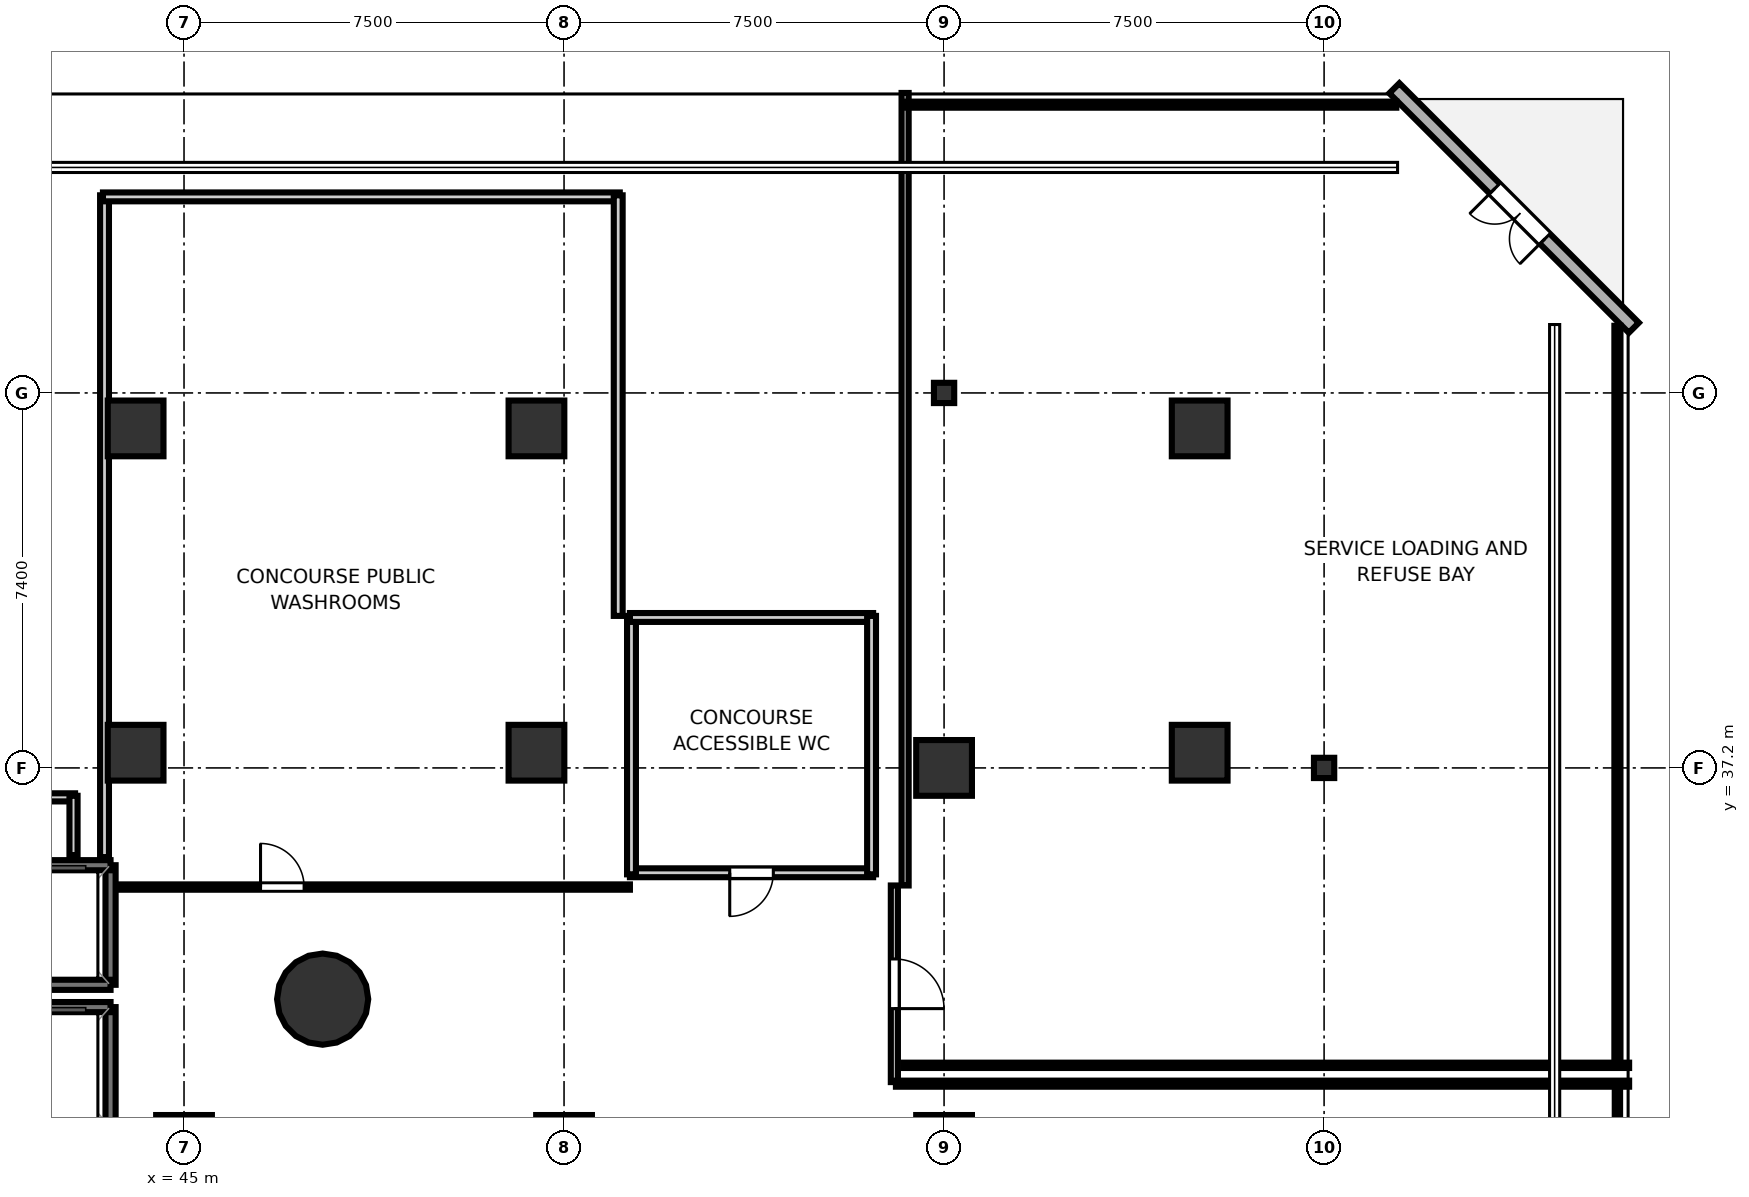
"""IFC4 building model, lengths in metres.
Left out: names, types, materials, properties, quantities, classifications, styles, units other than length and angle.
Written with IfcOpenShell. Run it as: python <this file> out.ifc"""

import sys

from ifc_helpers import new_model, si_unit, direction, frame, frame_2d, origin, origin_2d, place, context, subcontext, project, spatial, rectangle, hollow_circle, i_section, extrude, element, fill, save


model = new_model("IFC4")
c1 = context("Model", 3, precision=1e-05, world=origin(), true_north=direction((0.0, 1.0)))
c2 = subcontext(c1, "Body", "Model", "MODEL_VIEW")
j1 = project(units=[si_unit("LENGTHUNIT", "METRE"), si_unit("PLANEANGLEUNIT", "RADIAN")], contexts=[c1])
p1 = place(None, origin())
s1 = spatial("IfcSite", under=j1, at=p1, CompositionType="ELEMENT")
p2 = place(p1, origin())
s2 = spatial("IfcBuilding", under=s1, at=p2, CompositionType="ELEMENT")
p3 = place(p2, origin())
s3 = spatial("IfcBuildingStorey", under=s2, at=p3, CompositionType="ELEMENT", Elevation=0.0)
p4 = place(p3, frame((47.736, 32.637, 0.0), z_axis=(0.0, 0.0, 1.0), x_axis=(1.0, 0.0, 0.0)))
e1 = element("IfcColumn", 1, at=p4, inside=s3, PredefinedType="COLUMN", context=c2, shape_type="SweptSolid", body=[
    extrude(hollow_circle(Radius=0.9, WallThickness=0.045, at=origin_2d()), origin(), (0.0, 0.0, 1.0), 6.0),
])
for number, where, z_axis, x_axis in (
    (2, (44.045, 43.9, 0.0), (0.0, 0.0, 1.0), (1.0, 0.0, 0.0)),
    (3, (44.045, 37.5, 0.0), (0.0, 0.0, 1.0), (1.0, 0.0, 0.0)),
    (4, (51.955, 43.9, 0.0), (0.0, 0.0, 1.0), (1.0, 0.0, 0.0)),
    (5, (51.955, 37.5, 0.0), (0.0, 0.0, 1.0), (1.0, 0.0, 0.0)),
    (6, (65.045, 43.9, 0.0), (0.0, 0.0, 1.0), (1.0, 0.0, 0.0)),
    (7, (65.045, 37.5, 0.0), (0.0, 0.0, 1.0), (1.0, 0.0, 0.0)),
    (8, (45.0, 29.8, 0.0), (0.0, 0.0, 1.0), (1.0, 0.0, 0.0)),
    (9, (52.5, 29.8, 0.0), (0.0, 0.0, 1.0), (1.0, 0.0, 0.0)),
    (10, (60.0, 29.8, 0.0), (0.0, 0.0, 1.0), (1.0, 0.0, 0.0)),
    (11, (60.0, 37.2, 0.0), (0.0, 0.0, 1.0), (1.0, 0.0, 0.0)),
):
    element("IfcColumn", number, at=place(p3, frame(where, z_axis=z_axis, x_axis=x_axis)), inside=s3, PredefinedType="COLUMN", context=c2, shape_type="SweptSolid", body=[
        extrude(rectangle(XDim=1.1, YDim=1.1, at=origin_2d()), origin(), (0.0, 0.0, 1.0), 6.0),
    ])
for number, where, z_axis, x_axis in (
    (12, (60.0, 44.6, 0.0), (0.0, 0.0, 1.0), (1.0, 0.0, 0.0)),
    (13, (67.5, 37.2, 0.0), (0.0, 0.0, 1.0), (1.0, 0.0, 0.0)),
):
    element("IfcColumn", number, at=place(p3, frame(where, z_axis=z_axis, x_axis=x_axis)), inside=s3, PredefinedType="COLUMN", context=c2, shape_type="SweptSolid", body=[
        extrude(i_section(OverallWidth=0.4, OverallDepth=0.4, WebThickness=0.013, FlangeThickness=0.021, at=origin_2d()), origin(), (0.0, 0.0, 1.0), 6.0),
    ])
p5 = place(p3, frame((73.613, 45.887, 0.0), z_axis=(0.0, 0.0, 1.0), x_axis=(-0.707106781187, 0.707106781187, 0.0)))
e14 = element("IfcWall", 14, at=p5, inside=s3, PredefinedType="SOLIDWALL", context=c2, shape_type="SweptSolid", body=[
    extrude(rectangle(XDim=6.684, YDim=0.28, at=frame_2d((3.342, 0.0))), origin(), (0.0, 0.0, 1.0), 5.78),
])
p6 = place(p5, frame((2.482, 0.0, 0.0)))
e15 = element("IfcOpeningElement", 15, at=p6, cuts=e14, PredefinedType="OPENING", context=c2, shape_type="SweptSolid", body=[
    extrude(rectangle(XDim=1.4, YDim=2.2, at=frame_2d((0.7, 1.1))), frame((0.0, 0.15, 0.0), z_axis=(0.0, -1.0, 0.0), x_axis=(1.0, 0.0, 0.0)), (0.0, 0.0, 1.0), 0.3),
])
p7 = place(p3, frame((43.55, 30.12, 0.0), z_axis=(0.0, 0.0, 1.0), x_axis=(0.0, 1.0, 0.0)))
e16 = element("IfcWall", 16, at=p7, inside=s3, PredefinedType="SOLIDWALL", context=c2, shape_type="SweptSolid", body=[
    extrude(rectangle(XDim=2.36, YDim=0.2, at=frame_2d((1.18, 0.0))), origin(), (0.0, 0.0, 1.0), 5.78),
])
p8 = place(p3, frame((41.45, 32.48, 0.0), z_axis=(0.0, 0.0, 1.0), x_axis=(1.0, 0.0, 0.0)))
e17 = element("IfcWall", 17, at=p8, inside=s3, PredefinedType="SOLIDWALL", context=c2, shape_type="SweptSolid", body=[
    extrude(rectangle(XDim=2.1, YDim=0.2, at=frame_2d((1.05, 0.0))), origin(), (0.0, 0.0, 1.0), 5.78),
])
p9 = place(p3, frame((43.55, 32.92, 0.0), z_axis=(0.0, 0.0, 1.0), x_axis=(0.0, 1.0, 0.0)))
e18 = element("IfcWall", 18, at=p9, inside=s3, PredefinedType="SOLIDWALL", context=c2, shape_type="SweptSolid", body=[
    extrude(rectangle(XDim=2.36, YDim=0.2, at=frame_2d((1.18, 0.0))), origin(), (0.0, 0.0, 1.0), 5.78),
])
for number, where, z_axis, x_axis in (
    (19, (41.45, 35.28, 0.0), (0.0, 0.0, 1.0), (1.0, 0.0, 0.0)),
    (20, (41.45, 32.92, 0.0), (0.0, 0.0, 1.0), (1.0, 0.0, 0.0)),
):
    element("IfcWall", number, at=place(p3, frame(where, z_axis=z_axis, x_axis=x_axis)), inside=s3, PredefinedType="SOLIDWALL", context=c2, shape_type="SweptSolid", body=[
        extrude(rectangle(XDim=2.1, YDim=0.2, at=frame_2d((1.05, 0.0))), origin(), (0.0, 0.0, 1.0), 5.78),
    ])
p10 = place(p3, frame((39.88, 36.619, 0.0), z_axis=(0.0, 0.0, 1.0), x_axis=(1.0, 0.0, 0.0)))
e21 = element("IfcWall", 21, at=p10, inside=s3, PredefinedType="PARTITIONING", context=c2, shape_type="SweptSolid", body=[
    extrude(rectangle(XDim=2.97, YDim=0.16, at=frame_2d((1.485, 0.0))), origin(), (0.0, 0.0, 1.0), 5.1),
])
p11 = place(p3, frame((42.819, 36.65, 0.0), z_axis=(0.0, 0.0, 1.0), x_axis=(0.0, -1.0, 0.0)))
e22 = element("IfcWall", 22, at=p11, inside=s3, PredefinedType="PARTITIONING", context=c2, shape_type="SweptSolid", body=[
    extrude(rectangle(XDim=1.17, YDim=0.16, at=frame_2d((0.585, 0.0))), origin(), (0.0, 0.0, 1.0), 5.1),
])
p12 = place(p3, frame((58.6, 35.131, 0.0), z_axis=(0.0, 0.0, 1.0), x_axis=(-1.0, 0.0, 0.0)))
e23 = element("IfcWall", 23, at=p12, inside=s3, PredefinedType="PLUMBINGWALL", context=c2, shape_type="SweptSolid", body=[
    extrude(rectangle(XDim=4.8, YDim=0.175, at=frame_2d((2.4, 0.0))), origin(), (0.0, 0.0, 1.0), 5.1),
])
p13 = place(p12, frame((1.97, 0.0, 0.0)))
e24 = element("IfcOpeningElement", 24, at=p13, cuts=e23, PredefinedType="OPENING", context=c2, shape_type="SweptSolid", body=[
    extrude(rectangle(XDim=0.86, YDim=2.05, at=frame_2d((0.43, 1.025))), frame((0.0, 0.097, 0.0), z_axis=(0.0, -1.0, 0.0), x_axis=(1.0, 0.0, 0.0)), (0.0, 0.0, 1.0), 0.195),
])
p14 = place(p3, frame((53.831, 35.1, 0.0), z_axis=(0.0, 0.0, 1.0), x_axis=(0.0, 1.0, 0.0)))
e25 = element("IfcWall", 25, at=p14, inside=s3, PredefinedType="PLUMBINGWALL", context=c2, shape_type="SweptSolid", body=[
    extrude(rectangle(XDim=5.1, YDim=0.175, at=frame_2d((2.55, 0.0))), origin(), (0.0, 0.0, 1.0), 5.1),
])
p15 = place(p3, frame((53.8, 40.169, 0.0), z_axis=(0.0, 0.0, 1.0), x_axis=(1.0, 0.0, 0.0)))
e26 = element("IfcWall", 26, at=p15, inside=s3, PredefinedType="PLUMBINGWALL", context=c2, shape_type="SweptSolid", body=[
    extrude(rectangle(XDim=4.8, YDim=0.175, at=frame_2d((2.4, 0.0))), origin(), (0.0, 0.0, 1.0), 5.1),
])
p16 = place(p3, frame((58.569, 40.2, 0.0), z_axis=(0.0, 0.0, 1.0), x_axis=(0.0, -1.0, 0.0)))
e27 = element("IfcWall", 27, at=p16, inside=s3, PredefinedType="PLUMBINGWALL", context=c2, shape_type="SweptSolid", body=[
    extrude(rectangle(XDim=5.1, YDim=0.175, at=frame_2d((2.55, 0.0))), origin(), (0.0, 0.0, 1.0), 5.1),
])
p17 = place(p3, frame((43.72, 34.849, 0.0), z_axis=(0.0, 0.0, 1.0), x_axis=(1.0, 0.0, 0.0)))
e28 = element("IfcWall", 28, at=p17, inside=s3, PredefinedType="PARTITIONING", context=c2, shape_type="SweptSolid", body=[
    extrude(rectangle(XDim=10.08, YDim=0.105, at=frame_2d((5.04, 0.0))), origin(), (0.0, 0.0, 1.0), 5.1),
])
p18 = place(p17, frame((2.79, 0.0, 0.0)))
e29 = element("IfcOpeningElement", 29, at=p18, cuts=e28, PredefinedType="OPENING", context=c2, shape_type="SweptSolid", body=[
    extrude(rectangle(XDim=0.86, YDim=2.05, at=frame_2d((0.43, 1.025))), frame((0.0, 0.062, 0.0), z_axis=(0.0, -1.0, 0.0), x_axis=(1.0, 0.0, 0.0)), (0.0, 0.0, 1.0), 0.125),
])
p19 = place(p3, frame((59.019, 34.88, 0.0), z_axis=(0.0, 0.0, 1.0), x_axis=(0.0, -1.0, 0.0)))
e30 = element("IfcWall", 30, at=p19, inside=s3, PredefinedType="PARTITIONING", context=c2, shape_type="SweptSolid", body=[
    extrude(rectangle(XDim=3.88, YDim=0.14, at=frame_2d((1.94, 0.0))), origin(), (0.0, 0.0, 1.0), 5.1),
])
p20 = place(p19, frame((1.45, 0.0, 0.0)))
e31 = element("IfcOpeningElement", 31, at=p20, cuts=e30, PredefinedType="OPENING", context=c2, shape_type="SweptSolid", body=[
    extrude(rectangle(XDim=0.98, YDim=2.1, at=frame_2d((0.49, 1.05))), frame((0.0, 0.08, 0.0), z_axis=(0.0, -1.0, 0.0), x_axis=(1.0, 0.0, 0.0)), (0.0, 0.0, 1.0), 0.16),
])
p21 = place(p3, frame((59.05, 30.969, 0.0), z_axis=(0.0, 0.0, 1.0), x_axis=(1.0, 0.0, 0.0)))
e32 = element("IfcWall", 32, at=p21, inside=s3, PredefinedType="PARTITIONING", context=c2, shape_type="SweptSolid", body=[
    extrude(rectangle(XDim=14.47, YDim=0.12, at=frame_2d((7.235, 0.0))), origin(), (0.0, 0.0, 1.0), 5.1),
])
p22 = place(p3, frame((73.289, 31.0, 0.0), z_axis=(0.0, 0.0, 1.0), x_axis=(0.0, -1.0, 0.0)))
e33 = element("IfcWall", 33, at=p22, inside=s3, PredefinedType="PARTITIONING", context=c2, shape_type="SweptSolid", body=[
    extrude(rectangle(XDim=10.0, YDim=0.105, at=frame_2d((5.0, 0.0))), origin(), (0.0, 0.0, 1.0), 5.1),
])
p23 = place(p3, frame((73.289, 45.925, 0.0), z_axis=(0.0, 0.0, 1.0), x_axis=(0.0, -1.0, 0.0)))
e34 = element("IfcWall", 34, at=p23, inside=s3, PredefinedType="PARTITIONING", context=c2, shape_type="SweptSolid", body=[
    extrude(rectangle(XDim=14.625, YDim=0.12, at=frame_2d((7.312, 0.0))), origin(), (0.0, 0.0, 1.0), 5.1),
])
p24 = place(p3, frame((73.52, 31.331, 0.0), z_axis=(0.0, 0.0, 1.0), x_axis=(-1.0, 0.0, 0.0)))
e35 = element("IfcWall", 35, at=p24, inside=s3, PredefinedType="PARTITIONING", context=c2, shape_type="SweptSolid", body=[
    extrude(rectangle(XDim=14.32, YDim=0.105, at=frame_2d((7.16, 0.0))), origin(), (0.0, 0.0, 1.0), 5.1),
])
p25 = place(p3, frame((59.231, 34.88, 0.0), z_axis=(0.0, 0.0, 1.0), x_axis=(0.0, 1.0, 0.0)))
e36 = element("IfcWall", 36, at=p25, inside=s3, PredefinedType="PARTITIONING", context=c2, shape_type="SweptSolid", body=[
    extrude(rectangle(XDim=15.64, YDim=0.14, at=frame_2d((7.82, 0.0))), origin(), (0.0, 0.0, 1.0), 5.1),
])
p26 = place(p3, frame((59.2, 50.289, 0.0), z_axis=(0.0, 0.0, 1.0), x_axis=(1.0, 0.0, 0.0)))
e37 = element("IfcWall", 37, at=p26, inside=s3, PredefinedType="PARTITIONING", context=c2, shape_type="SweptSolid", body=[
    extrude(rectangle(XDim=9.725, YDim=0.12, at=frame_2d((4.863, 0.0))), origin(), (0.0, 0.0, 1.0), 5.1),
])
p27 = place(p3, frame((43.431, 35.44, 0.0), z_axis=(0.0, 0.0, 1.0), x_axis=(0.0, 1.0, 0.0)))
e38 = element("IfcWall", 38, at=p27, inside=s3, PredefinedType="PLUMBINGWALL", context=c2, shape_type="SweptSolid", body=[
    extrude(rectangle(XDim=13.06, YDim=0.175, at=frame_2d((6.53, 0.0))), origin(), (0.0, 0.0, 1.0), 5.1),
])
p28 = place(p3, frame((43.4, 48.469, 0.0), z_axis=(0.0, 0.0, 1.0), x_axis=(1.0, 0.0, 0.0)))
e39 = element("IfcWall", 39, at=p28, inside=s3, PredefinedType="PLUMBINGWALL", context=c2, shape_type="SweptSolid", body=[
    extrude(rectangle(XDim=10.2, YDim=0.175, at=frame_2d((5.1, 0.0))), origin(), (0.0, 0.0, 1.0), 5.1),
])
p29 = place(p3, frame((53.569, 48.5, 0.0), z_axis=(0.0, 0.0, 1.0), x_axis=(0.0, -1.0, 0.0)))
e40 = element("IfcWall", 40, at=p29, inside=s3, PredefinedType="PLUMBINGWALL", context=c2, shape_type="SweptSolid", body=[
    extrude(rectangle(XDim=8.3, YDim=0.175, at=frame_2d((4.15, 0.0))), origin(), (0.0, 0.0, 1.0), 5.1),
])
p30 = place(p6, origin())
e41 = element("IfcDoor", 41, at=p30, inside=s3, OperationType="DOUBLE_DOOR_SINGLE_SWING", PredefinedType="DOOR", context=c2, shape_type="SweptSolid", body=[
    extrude(rectangle(XDim=1.4, YDim=2.2, at=frame_2d((0.7, 1.1))), frame((0.0, 0.025, 0.0), z_axis=(0.0, -1.0, 0.0), x_axis=(1.0, 0.0, 0.0)), (0.0, 0.0, 1.0), 0.05),
])
fill(e15, e41)
p31 = place(p13, origin())
e42 = element("IfcDoor", 42, at=p31, inside=s3, OperationType="SINGLE_SWING_RIGHT", PredefinedType="DOOR", context=c2, shape_type="SweptSolid", body=[
    extrude(rectangle(XDim=0.86, YDim=2.05, at=frame_2d((0.43, 1.025))), frame((0.0, 0.025, 0.0), z_axis=(0.0, -1.0, 0.0), x_axis=(1.0, 0.0, 0.0)), (0.0, 0.0, 1.0), 0.05),
])
fill(e24, e42)
p32 = place(p20, origin())
e43 = element("IfcDoor", 43, at=p32, inside=s3, OperationType="SINGLE_SWING_RIGHT", PredefinedType="DOOR", context=c2, shape_type="SweptSolid", body=[
    extrude(rectangle(XDim=0.98, YDim=2.1, at=frame_2d((0.49, 1.05))), frame((0.0, 0.025, 0.0), z_axis=(0.0, -1.0, 0.0), x_axis=(1.0, 0.0, 0.0)), (0.0, 0.0, 1.0), 0.05),
])
fill(e31, e43)
p33 = place(p18, origin())
e44 = element("IfcDoor", 44, at=p33, inside=s3, OperationType="SINGLE_SWING_LEFT", PredefinedType="DOOR", context=c2, shape_type="SweptSolid", body=[
    extrude(rectangle(XDim=0.86, YDim=2.05, at=frame_2d((0.43, 1.025))), frame((0.0, 0.025, 0.0), z_axis=(0.0, -1.0, 0.0), x_axis=(1.0, 0.0, 0.0)), (0.0, 0.0, 1.0), 0.05),
])
fill(e29, e44)
save(model, sys.argv[1])
